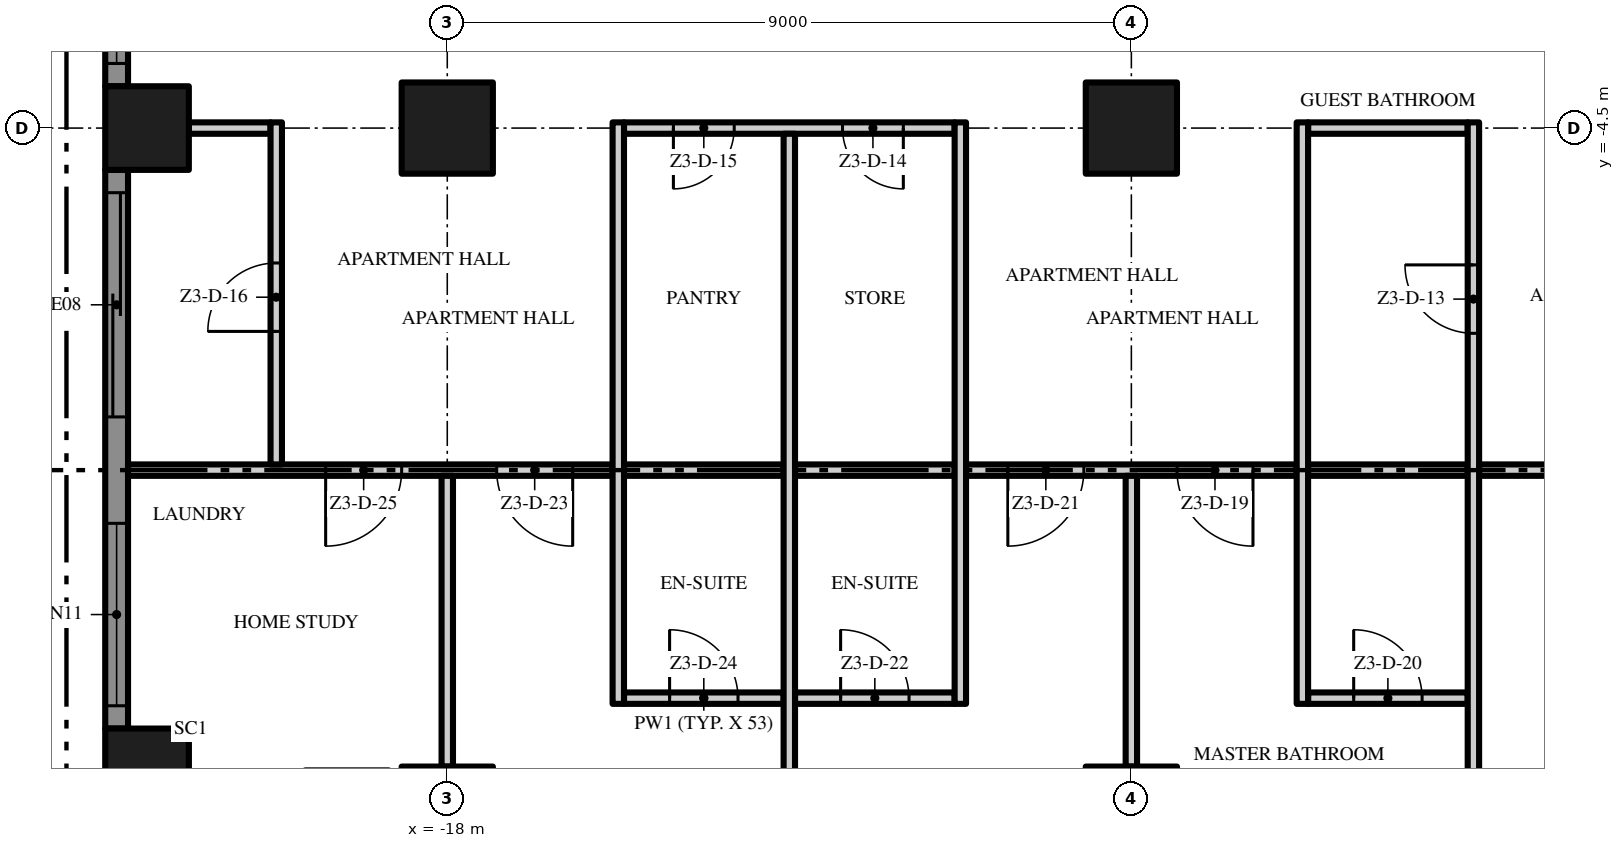
"""IFC4 building model, lengths in metres.
Left out: names, types, materials, properties, quantities, classifications, styles, units other than length and angle.
Written with IfcOpenShell. Run it as: python <this file> out.ifc"""

import sys

from ifc_helpers import new_model, si_unit, direction, frame, frame_2d, origin, origin_2d, place, context, subcontext, project, spatial, polyline, rectangle, outline, extrude, element, fill, save


model = new_model("IFC4")
c1 = context("Model", 3, precision=1e-05, world=origin(), true_north=direction((0.0, 1.0)))
c2 = subcontext(c1, "Body", "Model", "MODEL_VIEW")
j1 = project(units=[si_unit("LENGTHUNIT", "METRE"), si_unit("PLANEANGLEUNIT", "RADIAN")], contexts=[c1])
p1 = place(None, origin())
s1 = spatial("IfcSite", under=j1, at=p1, CompositionType="ELEMENT")
p2 = place(p1, origin())
s2 = spatial("IfcBuilding", under=s1, at=p2, CompositionType="ELEMENT")
p3 = place(p2, frame((0.0, 0.0, 159.2)))
s3 = spatial("IfcBuildingStorey", under=s2, at=p3, CompositionType="ELEMENT", Elevation=159.2)
for number, where, z_axis, x_axis in (
    (1, (-18.0, -13.5, 0.0), (0.0, 0.0, 1.0), (1.0, 0.0, 0.0)),
    (2, (-18.0, -4.5, 0.0), (0.0, 0.0, 1.0), (1.0, 0.0, 0.0)),
):
    element("IfcColumn", number, at=place(p3, frame(where, z_axis=z_axis, x_axis=x_axis)), inside=s3, PredefinedType="COLUMN", context=c2, shape_type="SweptSolid", body=[
        extrude(rectangle(XDim=1.2, YDim=1.2, at=origin_2d()), origin(), (0.0, 0.0, 1.0), 3.5),
    ])
for number, where, z_axis, x_axis in (
    (3, (-21.95, -12.95, 0.0), (0.0, 0.0, 1.0), (1.0, 0.0, 0.0)),
    (4, (-21.95, -4.5, 0.0), (0.0, 0.0, 1.0), (1.0, 0.0, 0.0)),
):
    element("IfcColumn", number, at=place(p3, frame(where, z_axis=z_axis, x_axis=x_axis)), inside=s3, PredefinedType="COLUMN", context=c2, shape_type="SweptSolid", body=[
        extrude(rectangle(XDim=1.1, YDim=1.1, at=origin_2d()), origin(), (0.0, 0.0, 1.0), 3.5),
    ])
for number, where, z_axis, x_axis in (
    (5, (-9.0, -13.5, 0.0), (0.0, 0.0, 1.0), (1.0, 0.0, 0.0)),
    (6, (-9.0, -4.5, 0.0), (0.0, 0.0, 1.0), (1.0, 0.0, 0.0)),
):
    element("IfcColumn", number, at=place(p3, frame(where, z_axis=z_axis, x_axis=x_axis)), inside=s3, PredefinedType="COLUMN", context=c2, shape_type="SweptSolid", body=[
        extrude(rectangle(XDim=1.2, YDim=1.2, at=origin_2d()), origin(), (0.0, 0.0, 1.0), 3.5),
    ])
p4 = place(p3, frame((-22.35, -3.95, 0.0), z_axis=(0.0, 0.0, 1.0), x_axis=(0.0, 1.0, 0.0)))
e7 = element("IfcWall", 7, at=p4, inside=s3, PredefinedType="SOLIDWALL", context=c2, shape_type="SweptSolid", body=[
    extrude(rectangle(XDim=7.9, YDim=0.3, at=frame_2d((3.95, 0.0))), origin(), (0.0, 0.0, 1.0), 3.5),
])
p5 = place(p4, frame((4.65, 0.0, 0.45)))
e8 = element("IfcOpeningElement", 8, at=p5, cuts=e7, PredefinedType="OPENING", context=c2, shape_type="SweptSolid", body=[
    extrude(rectangle(XDim=2.95, YDim=2.65, at=frame_2d((1.475, 1.325))), frame((0.0, 0.16, 0.0), z_axis=(0.0, -1.0, 0.0), x_axis=(1.0, 0.0, 0.0)), (0.0, 0.0, 1.0), 0.32),
])
p6 = place(p4, frame((0.3, 0.0, 0.45)))
e9 = element("IfcOpeningElement", 9, at=p6, cuts=e7, PredefinedType="OPENING", context=c2, shape_type="SweptSolid", body=[
    extrude(rectangle(XDim=2.95, YDim=2.65, at=frame_2d((1.475, 1.325))), frame((0.0, 0.16, 0.0), z_axis=(0.0, -1.0, 0.0), x_axis=(1.0, 0.0, 0.0)), (0.0, 0.0, 1.0), 0.32),
])
p7 = place(p3, frame((-22.35, -12.4, 0.0), z_axis=(0.0, 0.0, 1.0), x_axis=(0.0, 1.0, 0.0)))
e10 = element("IfcWall", 10, at=p7, inside=s3, PredefinedType="SOLIDWALL", context=c2, shape_type="SweptSolid", body=[
    extrude(rectangle(XDim=7.35, YDim=0.3, at=frame_2d((3.675, 0.0))), origin(), (0.0, 0.0, 1.0), 3.5),
])
p8 = place(p7, frame((4.1, 0.0, 0.0)))
e11 = element("IfcOpeningElement", 11, at=p8, cuts=e10, PredefinedType="OPENING", context=c2, shape_type="SweptSolid", body=[
    extrude(rectangle(XDim=2.95, YDim=2.4, at=frame_2d((1.475, 1.2))), frame((0.0, 0.16, 0.0), z_axis=(0.0, -1.0, 0.0), x_axis=(1.0, 0.0, 0.0)), (0.0, 0.0, 1.0), 0.32),
])
p9 = place(p7, frame((0.3, 0.0, 0.45)))
e12 = element("IfcOpeningElement", 12, at=p9, cuts=e10, PredefinedType="OPENING", context=c2, shape_type="SweptSolid", body=[
    extrude(rectangle(XDim=2.4, YDim=2.65, at=frame_2d((1.2, 1.325))), frame((0.0, 0.16, 0.0), z_axis=(0.0, -1.0, 0.0), x_axis=(1.0, 0.0, 0.0)), (0.0, 0.0, 1.0), 0.32),
])
p10 = place(p3, origin())
e13 = element("IfcWall", 13, at=p10, inside=s3, PredefinedType="USERDEFINED", context=c2, shape_type="SweptSolid", body=[
    extrude(outline(polyline([(-24.3, 18.0), (-23.595, 16.5), (-23.159, 15.0), (-23.1, 14.25), (-23.159, 13.5), (-23.595, 12.0), (-24.3, 10.5), (-25.005, 9.0), (-25.441, 7.5), (-25.5, 6.75), (-25.441, 6.0), (-25.005, 4.5), (-24.3, 3.0), (-23.595, 1.5), (-23.159, 0.0), (-23.1, -0.75), (-23.159, -1.5), (-23.595, -3.0), (-24.3, -4.5), (-25.005, -6.0), (-25.441, -7.5), (-25.5, -8.25), (-25.441, -9.0), (-25.005, -10.5), (-24.3, -12.0), (-23.595, -13.5), (-23.368, -13.394), (-24.074, -11.894), (-24.771, -10.411), (-25.194, -8.955), (-25.249, -8.25), (-25.194, -7.545), (-24.771, -6.089), (-24.074, -4.606), (-23.36, -3.089), (-22.911, -1.545), (-22.849, -0.75), (-22.911, 0.045), (-23.36, 1.589), (-24.074, 3.106), (-24.771, 4.589), (-25.194, 6.045), (-25.249, 6.75), (-25.194, 7.455), (-24.771, 8.911), (-24.074, 10.394), (-23.36, 11.911), (-22.911, 13.455), (-22.849, 14.25), (-22.911, 15.045), (-23.36, 16.589), (-24.074, 18.106), (-24.3, 18.0)])), origin(), (0.0, 0.0, 1.0), 0.9),
])
p11 = place(p3, frame((-15.675, -12.0, 0.0), z_axis=(0.0, 0.0, 1.0), x_axis=(1.0, 0.0, 0.0)))
e14 = element("IfcWall", 14, at=p11, inside=s3, PredefinedType="PARTITIONING", context=c2, shape_type="SweptSolid", body=[
    extrude(rectangle(XDim=2.1, YDim=0.15, at=frame_2d((1.05, 0.0))), origin(), (0.0, 0.0, 1.0), 3.5),
])
p12 = place(p11, frame((0.6, 0.0, 0.0)))
e15 = element("IfcOpeningElement", 15, at=p12, cuts=e14, PredefinedType="OPENING", context=c2, shape_type="SweptSolid", body=[
    extrude(rectangle(XDim=0.9, YDim=2.1, at=frame_2d((0.45, 1.05))), frame((0.0, 0.085, 0.0), z_axis=(0.0, -1.0, 0.0), x_axis=(1.0, 0.0, 0.0)), (0.0, 0.0, 1.0), 0.17),
])
p13 = place(p3, frame((-13.425, -12.0, 0.0), z_axis=(0.0, 0.0, 1.0), x_axis=(1.0, 0.0, 0.0)))
e16 = element("IfcWall", 16, at=p13, inside=s3, PredefinedType="PARTITIONING", context=c2, shape_type="SweptSolid", body=[
    extrude(rectangle(XDim=2.1, YDim=0.15, at=frame_2d((1.05, 0.0))), origin(), (0.0, 0.0, 1.0), 3.5),
])
p14 = place(p13, frame((0.6, 0.0, 0.0)))
e17 = element("IfcOpeningElement", 17, at=p14, cuts=e16, PredefinedType="OPENING", context=c2, shape_type="SweptSolid", body=[
    extrude(rectangle(XDim=0.9, YDim=2.1, at=frame_2d((0.45, 1.05))), frame((0.0, 0.085, 0.0), z_axis=(0.0, -1.0, 0.0), x_axis=(1.0, 0.0, 0.0)), (0.0, 0.0, 1.0), 0.17),
])
p15 = place(p3, frame((-6.675, -12.0, 0.0), z_axis=(0.0, 0.0, 1.0), x_axis=(1.0, 0.0, 0.0)))
e18 = element("IfcWall", 18, at=p15, inside=s3, PredefinedType="PARTITIONING", context=c2, shape_type="SweptSolid", body=[
    extrude(rectangle(XDim=2.1, YDim=0.15, at=frame_2d((1.05, 0.0))), origin(), (0.0, 0.0, 1.0), 3.5),
])
p16 = place(p15, frame((0.6, 0.0, 0.0)))
e19 = element("IfcOpeningElement", 19, at=p16, cuts=e18, PredefinedType="OPENING", context=c2, shape_type="SweptSolid", body=[
    extrude(rectangle(XDim=0.9, YDim=2.1, at=frame_2d((0.45, 1.05))), frame((0.0, 0.085, 0.0), z_axis=(0.0, -1.0, 0.0), x_axis=(1.0, 0.0, 0.0)), (0.0, 0.0, 1.0), 0.17),
])
p17 = place(p3, frame((-15.825, -9.0, 0.0), z_axis=(0.0, 0.0, 1.0), x_axis=(-1.0, 0.0, 0.0)))
e20 = element("IfcWall", 20, at=p17, inside=s3, PredefinedType="PARTITIONING", context=c2, shape_type="SweptSolid", body=[
    extrude(rectangle(XDim=6.375, YDim=0.15, at=frame_2d((3.188, 0.0))), origin(), (0.0, 0.0, 1.0), 3.5),
])
p18 = place(p17, frame((0.525, 0.0, 0.0)))
e21 = element("IfcOpeningElement", 21, at=p18, cuts=e20, PredefinedType="OPENING", context=c2, shape_type="SweptSolid", body=[
    extrude(rectangle(XDim=1.0, YDim=2.4, at=frame_2d((0.5, 1.2))), frame((0.0, 0.085, 0.0), z_axis=(0.0, -1.0, 0.0), x_axis=(1.0, 0.0, 0.0)), (0.0, 0.0, 1.0), 0.17),
])
p19 = place(p17, frame((2.775, 0.0, 0.0)))
e22 = element("IfcOpeningElement", 22, at=p19, cuts=e20, PredefinedType="OPENING", context=c2, shape_type="SweptSolid", body=[
    extrude(rectangle(XDim=1.0, YDim=2.4, at=frame_2d((0.5, 1.2))), frame((0.0, 0.085, 0.0), z_axis=(0.0, -1.0, 0.0), x_axis=(1.0, 0.0, 0.0)), (0.0, 0.0, 1.0), 0.17),
])
for number, where, z_axis, x_axis in (
    (23, (-15.675, -9.0, 0.0), (0.0, 0.0, 1.0), (1.0, 0.0, 0.0)),
    (24, (-13.425, -9.0, 0.0), (0.0, 0.0, 1.0), (1.0, 0.0, 0.0)),
):
    element("IfcWall", number, at=place(p3, frame(where, z_axis=z_axis, x_axis=x_axis)), inside=s3, PredefinedType="PARTITIONING", context=c2, shape_type="SweptSolid", body=[
        extrude(rectangle(XDim=2.1, YDim=0.15, at=frame_2d((1.05, 0.0))), origin(), (0.0, 0.0, 1.0), 3.5),
    ])
p20 = place(p3, frame((-6.825, -9.0, 0.0), z_axis=(0.0, 0.0, 1.0), x_axis=(-1.0, 0.0, 0.0)))
e25 = element("IfcWall", 25, at=p20, inside=s3, PredefinedType="PARTITIONING", context=c2, shape_type="SweptSolid", body=[
    extrude(rectangle(XDim=4.35, YDim=0.15, at=frame_2d((2.175, 0.0))), origin(), (0.0, 0.0, 1.0), 3.5),
])
p21 = place(p20, frame((0.575, 0.0, 0.0)))
e26 = element("IfcOpeningElement", 26, at=p21, cuts=e25, PredefinedType="OPENING", context=c2, shape_type="SweptSolid", body=[
    extrude(rectangle(XDim=1.0, YDim=2.4, at=frame_2d((0.5, 1.2))), frame((0.0, 0.085, 0.0), z_axis=(0.0, -1.0, 0.0), x_axis=(1.0, 0.0, 0.0)), (0.0, 0.0, 1.0), 0.17),
])
p22 = place(p20, frame((2.8, 0.0, 0.0)))
e27 = element("IfcOpeningElement", 27, at=p22, cuts=e25, PredefinedType="OPENING", context=c2, shape_type="SweptSolid", body=[
    extrude(rectangle(XDim=1.0, YDim=2.4, at=frame_2d((0.5, 1.2))), frame((0.0, 0.085, 0.0), z_axis=(0.0, -1.0, 0.0), x_axis=(1.0, 0.0, 0.0)), (0.0, 0.0, 1.0), 0.17),
])
p23 = place(p3, frame((-6.675, -9.0, 0.0), z_axis=(0.0, 0.0, 1.0), x_axis=(1.0, 0.0, 0.0)))
e28 = element("IfcWall", 28, at=p23, inside=s3, PredefinedType="PARTITIONING", context=c2, shape_type="SweptSolid", body=[
    extrude(rectangle(XDim=2.1, YDim=0.15, at=frame_2d((1.05, 0.0))), origin(), (0.0, 0.0, 1.0), 3.5),
])
p24 = place(p3, frame((4.4, -9.0, 0.0), z_axis=(0.0, 0.0, 1.0), x_axis=(-1.0, 0.0, 0.0)))
e29 = element("IfcWall", 29, at=p24, inside=s3, PredefinedType="PARTITIONING", context=c2, shape_type="SweptSolid", body=[
    extrude(rectangle(XDim=8.825, YDim=0.15, at=frame_2d((4.412, 0.0))), origin(), (0.0, 0.0, 1.0), 3.5),
])
p25 = place(p24, frame((6.125, 0.0, 0.0)))
e30 = element("IfcOpeningElement", 30, at=p25, cuts=e29, PredefinedType="OPENING", context=c2, shape_type="SweptSolid", body=[
    extrude(rectangle(XDim=1.8, YDim=2.4, at=frame_2d((0.9, 1.2))), frame((0.0, 0.085, 0.0), z_axis=(0.0, -1.0, 0.0), x_axis=(1.0, 0.0, 0.0)), (0.0, 0.0, 1.0), 0.17),
])
p26 = place(p3, frame((-21.4, -4.5, 0.0), z_axis=(0.0, 0.0, 1.0), x_axis=(1.0, 0.0, 0.0)))
e31 = element("IfcWall", 31, at=p26, inside=s3, PredefinedType="PARTITIONING", context=c2, shape_type="SweptSolid", body=[
    extrude(rectangle(XDim=1.075, YDim=0.15, at=frame_2d((0.537, 0.0))), origin(), (0.0, 0.0, 1.0), 3.5),
])
p27 = place(p3, frame((-11.325, -4.5, 0.0), z_axis=(0.0, 0.0, 1.0), x_axis=(-1.0, 0.0, 0.0)))
e32 = element("IfcWall", 32, at=p27, inside=s3, PredefinedType="PARTITIONING", context=c2, shape_type="SweptSolid", body=[
    extrude(rectangle(XDim=4.35, YDim=0.15, at=frame_2d((2.175, 0.0))), origin(), (0.0, 0.0, 1.0), 3.5),
])
p28 = place(p27, frame((0.675, 0.0, 0.0)))
e33 = element("IfcOpeningElement", 33, at=p28, cuts=e32, PredefinedType="OPENING", context=c2, shape_type="SweptSolid", body=[
    extrude(rectangle(XDim=0.8, YDim=2.0, at=frame_2d((0.4, 1.0))), frame((0.0, 0.085, 0.0), z_axis=(0.0, -1.0, 0.0), x_axis=(1.0, 0.0, 0.0)), (0.0, 0.0, 1.0), 0.17),
])
p29 = place(p27, frame((2.9, 0.0, 0.0)))
e34 = element("IfcOpeningElement", 34, at=p29, cuts=e32, PredefinedType="OPENING", context=c2, shape_type="SweptSolid", body=[
    extrude(rectangle(XDim=0.8, YDim=2.0, at=frame_2d((0.4, 1.0))), frame((0.0, 0.085, 0.0), z_axis=(0.0, -1.0, 0.0), x_axis=(1.0, 0.0, 0.0)), (0.0, 0.0, 1.0), 0.17),
])
p30 = place(p3, frame((-6.675, -4.5, 0.0), z_axis=(0.0, 0.0, 1.0), x_axis=(1.0, 0.0, 0.0)))
e35 = element("IfcWall", 35, at=p30, inside=s3, PredefinedType="PARTITIONING", context=c2, shape_type="SweptSolid", body=[
    extrude(rectangle(XDim=2.1, YDim=0.15, at=frame_2d((1.05, 0.0))), origin(), (0.0, 0.0, 1.0), 3.5),
])
p31 = place(p3, frame((-20.25, -8.925, 0.0), z_axis=(0.0, 0.0, 1.0), x_axis=(0.0, 1.0, 0.0)))
e36 = element("IfcWall", 36, at=p31, inside=s3, PredefinedType="PARTITIONING", context=c2, shape_type="SweptSolid", body=[
    extrude(rectangle(XDim=4.5, YDim=0.15, at=frame_2d((2.25, 0.0))), origin(), (0.0, 0.0, 1.0), 3.5),
])
p32 = place(p31, frame((1.75, 0.0, 0.0)))
e37 = element("IfcOpeningElement", 37, at=p32, cuts=e36, PredefinedType="OPENING", context=c2, shape_type="SweptSolid", body=[
    extrude(rectangle(XDim=0.9, YDim=2.1, at=frame_2d((0.45, 1.05))), frame((0.0, 0.085, 0.0), z_axis=(0.0, -1.0, 0.0), x_axis=(1.0, 0.0, 0.0)), (0.0, 0.0, 1.0), 0.17),
])
p33 = place(p3, frame((-18.0, -12.9, 0.0), z_axis=(0.0, 0.0, 1.0), x_axis=(0.0, 1.0, 0.0)))
e38 = element("IfcWall", 38, at=p33, inside=s3, PredefinedType="PARTITIONING", context=c2, shape_type="SweptSolid", body=[
    extrude(rectangle(XDim=3.825, YDim=0.15, at=frame_2d((1.913, 0.0))), origin(), (0.0, 0.0, 1.0), 3.5),
])
p34 = place(p3, frame((-15.75, -12.075, 0.0), z_axis=(0.0, 0.0, 1.0), x_axis=(0.0, 1.0, 0.0)))
e39 = element("IfcWall", 39, at=p34, inside=s3, PredefinedType="PARTITIONING", context=c2, shape_type="SweptSolid", body=[
    extrude(rectangle(XDim=7.65, YDim=0.15, at=frame_2d((3.825, 0.0))), origin(), (0.0, 0.0, 1.0), 3.5),
])
p35 = place(p3, frame((-13.5, -17.7, 0.0), z_axis=(0.0, 0.0, 1.0), x_axis=(0.0, 1.0, 0.0)))
e40 = element("IfcWall", 40, at=p35, inside=s3, PredefinedType="PARTITIONING", context=c2, shape_type="SweptSolid", body=[
    extrude(rectangle(XDim=13.125, YDim=0.15, at=frame_2d((6.562, 0.0))), origin(), (0.0, 0.0, 1.0), 3.5),
])
p36 = place(p3, frame((-11.25, -12.075, 0.0), z_axis=(0.0, 0.0, 1.0), x_axis=(0.0, 1.0, 0.0)))
e41 = element("IfcWall", 41, at=p36, inside=s3, PredefinedType="PARTITIONING", context=c2, shape_type="SweptSolid", body=[
    extrude(rectangle(XDim=7.65, YDim=0.15, at=frame_2d((3.825, 0.0))), origin(), (0.0, 0.0, 1.0), 3.5),
])
p37 = place(p3, frame((-9.0, -12.9, 0.0), z_axis=(0.0, 0.0, 1.0), x_axis=(0.0, 1.0, 0.0)))
e42 = element("IfcWall", 42, at=p37, inside=s3, PredefinedType="PARTITIONING", context=c2, shape_type="SweptSolid", body=[
    extrude(rectangle(XDim=3.825, YDim=0.15, at=frame_2d((1.913, 0.0))), origin(), (0.0, 0.0, 1.0), 3.5),
])
p38 = place(p3, frame((-6.75, -12.075, 0.0), z_axis=(0.0, 0.0, 1.0), x_axis=(0.0, 1.0, 0.0)))
e43 = element("IfcWall", 43, at=p38, inside=s3, PredefinedType="PARTITIONING", context=c2, shape_type="SweptSolid", body=[
    extrude(rectangle(XDim=7.65, YDim=0.15, at=frame_2d((3.825, 0.0))), origin(), (0.0, 0.0, 1.0), 3.5),
])
p39 = place(p3, frame((-4.5, -17.7, 0.0), z_axis=(0.0, 0.0, 1.0), x_axis=(0.0, 1.0, 0.0)))
e44 = element("IfcWall", 44, at=p39, inside=s3, PredefinedType="PARTITIONING", context=c2, shape_type="SweptSolid", body=[
    extrude(rectangle(XDim=13.275, YDim=0.15, at=frame_2d((6.638, 0.0))), origin(), (0.0, 0.0, 1.0), 3.5),
])
p40 = place(p39, frame((10.5, 0.0, 0.0)))
e45 = element("IfcOpeningElement", 45, at=p40, cuts=e44, PredefinedType="OPENING", context=c2, shape_type="SweptSolid", body=[
    extrude(rectangle(XDim=0.9, YDim=2.1, at=frame_2d((0.45, 1.05))), frame((0.0, 0.085, 0.0), z_axis=(0.0, -1.0, 0.0), x_axis=(1.0, 0.0, 0.0)), (0.0, 0.0, 1.0), 0.17),
])
p41 = place(p6, origin())
e46 = element("IfcWindow", 46, at=p41, inside=s3, PartitioningType="SINGLE_PANEL", PredefinedType="WINDOW", context=c2, shape_type="SweptSolid", body=[
    extrude(rectangle(XDim=2.95, YDim=2.65, at=frame_2d((1.475, 1.325))), frame((0.0, 0.03, 0.0), z_axis=(0.0, -1.0, 0.0), x_axis=(1.0, 0.0, 0.0)), (0.0, 0.0, 1.0), 0.06),
])
fill(e9, e46)
p42 = place(p8, origin())
e47 = element("IfcDoor", 47, at=p42, inside=s3, OperationType="SINGLE_SWING_LEFT", PredefinedType="DOOR", context=c2, shape_type="SweptSolid", body=[
    extrude(rectangle(XDim=2.95, YDim=2.4, at=frame_2d((1.475, 1.2))), frame((0.0, 0.025, 0.0), z_axis=(0.0, -1.0, 0.0), x_axis=(1.0, 0.0, 0.0)), (0.0, 0.0, 1.0), 0.05),
])
fill(e11, e47)
p43 = place(p9, origin())
e48 = element("IfcWindow", 48, at=p43, inside=s3, PartitioningType="SINGLE_PANEL", PredefinedType="WINDOW", context=c2, shape_type="SweptSolid", body=[
    extrude(rectangle(XDim=2.4, YDim=2.65, at=frame_2d((1.2, 1.325))), frame((0.0, 0.03, 0.0), z_axis=(0.0, -1.0, 0.0), x_axis=(1.0, 0.0, 0.0)), (0.0, 0.0, 1.0), 0.06),
])
fill(e12, e48)
p44 = place(p40, origin())
e49 = element("IfcDoor", 49, at=p44, inside=s3, OperationType="SINGLE_SWING_RIGHT", PredefinedType="DOOR", context=c2, shape_type="SweptSolid", body=[
    extrude(rectangle(XDim=0.9, YDim=2.1, at=frame_2d((0.45, 1.05))), frame((0.0, 0.025, 0.0), z_axis=(0.0, -1.0, 0.0), x_axis=(1.0, 0.0, 0.0)), (0.0, 0.0, 1.0), 0.05),
])
fill(e45, e49)
p45 = place(p28, origin())
e50 = element("IfcDoor", 50, at=p45, inside=s3, OperationType="SINGLE_SWING_LEFT", PredefinedType="DOOR", context=c2, shape_type="SweptSolid", body=[
    extrude(rectangle(XDim=0.8, YDim=2.0, at=frame_2d((0.4, 1.0))), frame((0.0, 0.025, 0.0), z_axis=(0.0, -1.0, 0.0), x_axis=(1.0, 0.0, 0.0)), (0.0, 0.0, 1.0), 0.05),
])
fill(e33, e50)
p46 = place(p29, origin())
e51 = element("IfcDoor", 51, at=p46, inside=s3, OperationType="SINGLE_SWING_RIGHT", PredefinedType="DOOR", context=c2, shape_type="SweptSolid", body=[
    extrude(rectangle(XDim=0.8, YDim=2.0, at=frame_2d((0.4, 1.0))), frame((0.0, 0.025, 0.0), z_axis=(0.0, -1.0, 0.0), x_axis=(1.0, 0.0, 0.0)), (0.0, 0.0, 1.0), 0.05),
])
fill(e34, e51)
p47 = place(p32, origin())
e52 = element("IfcDoor", 52, at=p47, inside=s3, OperationType="SINGLE_SWING_LEFT", PredefinedType="DOOR", context=c2, shape_type="SweptSolid", body=[
    extrude(rectangle(XDim=0.9, YDim=2.1, at=frame_2d((0.45, 1.05))), frame((0.0, 0.025, 0.0), z_axis=(0.0, -1.0, 0.0), x_axis=(1.0, 0.0, 0.0)), (0.0, 0.0, 1.0), 0.05),
])
fill(e37, e52)
p48 = place(p21, origin())
e53 = element("IfcDoor", 53, at=p48, inside=s3, OperationType="SINGLE_SWING_LEFT", PredefinedType="DOOR", context=c2, shape_type="SweptSolid", body=[
    extrude(rectangle(XDim=1.0, YDim=2.4, at=frame_2d((0.5, 1.2))), frame((0.0, 0.025, 0.0), z_axis=(0.0, -1.0, 0.0), x_axis=(1.0, 0.0, 0.0)), (0.0, 0.0, 1.0), 0.05),
])
fill(e26, e53)
p49 = place(p16, origin())
e54 = element("IfcDoor", 54, at=p49, inside=s3, OperationType="SINGLE_SWING_LEFT", PredefinedType="DOOR", context=c2, shape_type="SweptSolid", body=[
    extrude(rectangle(XDim=0.9, YDim=2.1, at=frame_2d((0.45, 1.05))), frame((0.0, 0.025, 0.0), z_axis=(0.0, -1.0, 0.0), x_axis=(1.0, 0.0, 0.0)), (0.0, 0.0, 1.0), 0.05),
])
fill(e19, e54)
p50 = place(p22, origin())
e55 = element("IfcDoor", 55, at=p50, inside=s3, OperationType="SINGLE_SWING_RIGHT", PredefinedType="DOOR", context=c2, shape_type="SweptSolid", body=[
    extrude(rectangle(XDim=1.0, YDim=2.4, at=frame_2d((0.5, 1.2))), frame((0.0, 0.025, 0.0), z_axis=(0.0, -1.0, 0.0), x_axis=(1.0, 0.0, 0.0)), (0.0, 0.0, 1.0), 0.05),
])
fill(e27, e55)
p51 = place(p14, origin())
e56 = element("IfcDoor", 56, at=p51, inside=s3, OperationType="SINGLE_SWING_LEFT", PredefinedType="DOOR", context=c2, shape_type="SweptSolid", body=[
    extrude(rectangle(XDim=0.9, YDim=2.1, at=frame_2d((0.45, 1.05))), frame((0.0, 0.025, 0.0), z_axis=(0.0, -1.0, 0.0), x_axis=(1.0, 0.0, 0.0)), (0.0, 0.0, 1.0), 0.05),
])
fill(e17, e56)
p52 = place(p18, origin())
e57 = element("IfcDoor", 57, at=p52, inside=s3, OperationType="SINGLE_SWING_LEFT", PredefinedType="DOOR", context=c2, shape_type="SweptSolid", body=[
    extrude(rectangle(XDim=1.0, YDim=2.4, at=frame_2d((0.5, 1.2))), frame((0.0, 0.025, 0.0), z_axis=(0.0, -1.0, 0.0), x_axis=(1.0, 0.0, 0.0)), (0.0, 0.0, 1.0), 0.05),
])
fill(e21, e57)
p53 = place(p12, origin())
e58 = element("IfcDoor", 58, at=p53, inside=s3, OperationType="SINGLE_SWING_LEFT", PredefinedType="DOOR", context=c2, shape_type="SweptSolid", body=[
    extrude(rectangle(XDim=0.9, YDim=2.1, at=frame_2d((0.45, 1.05))), frame((0.0, 0.025, 0.0), z_axis=(0.0, -1.0, 0.0), x_axis=(1.0, 0.0, 0.0)), (0.0, 0.0, 1.0), 0.05),
])
fill(e15, e58)
p54 = place(p19, origin())
e59 = element("IfcDoor", 59, at=p54, inside=s3, OperationType="SINGLE_SWING_RIGHT", PredefinedType="DOOR", context=c2, shape_type="SweptSolid", body=[
    extrude(rectangle(XDim=1.0, YDim=2.4, at=frame_2d((0.5, 1.2))), frame((0.0, 0.025, 0.0), z_axis=(0.0, -1.0, 0.0), x_axis=(1.0, 0.0, 0.0)), (0.0, 0.0, 1.0), 0.05),
])
fill(e22, e59)
save(model, sys.argv[1])
